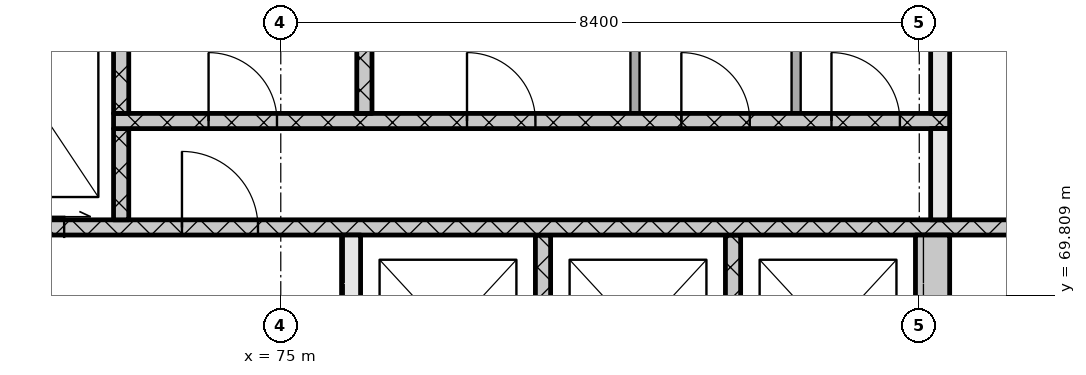
"""IFC4 building model, lengths in metres.
Left out: names, types, materials, properties, quantities, classifications, styles, units other than length and angle.
Written with IfcOpenShell. Run it as: python <this file> out.ifc"""

import sys

from ifc_helpers import new_model, si_unit, direction, frame, frame_2d, origin, place, context, subcontext, project, spatial, rectangle, extrude, element, fill, save


model = new_model("IFC4")
c1 = context("Model", 3, precision=1e-05, world=origin(), true_north=direction((0.0, 1.0)))
c2 = subcontext(c1, "Body", "Model", "MODEL_VIEW")
j1 = project(units=[si_unit("LENGTHUNIT", "METRE"), si_unit("PLANEANGLEUNIT", "RADIAN")], contexts=[c1])
p1 = place(None, origin())
s1 = spatial("IfcSite", under=j1, at=p1, CompositionType="ELEMENT")
p2 = place(p1, origin())
s2 = spatial("IfcBuilding", under=s1, at=p2, CompositionType="ELEMENT")
p3 = place(p2, frame((0.0, 0.0, 55.2)))
s3 = spatial("IfcBuildingStorey", under=s2, at=p3, CompositionType="ELEMENT", Elevation=55.2)
for number, where, z_axis, x_axis in (
    (1, (78.45, 68.0, 0.0), (0.0, 0.0, 1.0), (0.0, 1.0, 0.0)),
    (2, (80.95, 68.0, 0.0), (0.0, 0.0, 1.0), (0.0, 1.0, 0.0)),
):
    element("IfcWall", number, at=place(p3, frame(where, z_axis=z_axis, x_axis=x_axis)), inside=s3, PredefinedType="SOLIDWALL", context=c2, shape_type="SweptSolid", body=[
        extrude(rectangle(XDim=2.6, YDim=0.2, at=frame_2d((1.3, 0.0))), origin(), (0.0, 0.0, 1.0), 3.32),
    ])
p4 = place(p3, frame((83.575, 68.0, 0.0), z_axis=(0.0, 0.0, 1.0), x_axis=(0.0, 1.0, 0.0)))
e3 = element("IfcWall", 3, at=p4, inside=s3, PredefinedType="SOLIDWALL", context=c2, shape_type="SweptSolid", body=[
    extrude(rectangle(XDim=2.6, YDim=0.45, at=frame_2d((1.3, 0.0))), origin(), (0.0, 0.0, 1.0), 3.32),
])
p5 = place(p3, frame((75.925, 68.3, 0.0), z_axis=(0.0, 0.0, 1.0), x_axis=(0.0, 1.0, 0.0)))
e4 = element("IfcWall", 4, at=p5, inside=s3, PredefinedType="SOLIDWALL", context=c2, shape_type="SweptSolid", body=[
    extrude(rectangle(XDim=2.3, YDim=0.25, at=frame_2d((1.15, 0.0))), origin(), (0.0, 0.0, 1.0), 3.32),
])
p6 = place(p3, frame((67.8, 70.7, 0.0), z_axis=(0.0, 0.0, 1.0), x_axis=(1.0, 0.0, 0.0)))
e5 = element("IfcWall", 5, at=p6, inside=s3, PredefinedType="SOLIDWALL", context=c2, shape_type="SweptSolid", body=[
    extrude(rectangle(XDim=39.6, YDim=0.2, at=frame_2d((19.8, 0.0))), origin(), (0.0, 0.0, 1.0), 3.32),
])
p7 = place(p6, frame((0.65, 0.0, 0.0)))
e6 = element("IfcOpeningElement", 6, at=p7, cuts=e5, PredefinedType="OPENING", context=c2, shape_type="SweptSolid", body=[
    extrude(rectangle(XDim=1.1, YDim=2.1, at=frame_2d((0.55, 1.05))), frame((0.0, 0.11, 0.0), z_axis=(0.0, -1.0, 0.0), x_axis=(1.0, 0.0, 0.0)), (0.0, 0.0, 1.0), 0.22),
])
p8 = place(p6, frame((3.25, 0.0, 0.0)))
e7 = element("IfcOpeningElement", 7, at=p8, cuts=e5, PredefinedType="OPENING", context=c2, shape_type="SweptSolid", body=[
    extrude(rectangle(XDim=1.1, YDim=2.1, at=frame_2d((0.55, 1.05))), frame((0.0, 0.11, 0.0), z_axis=(0.0, -1.0, 0.0), x_axis=(1.0, 0.0, 0.0)), (0.0, 0.0, 1.0), 0.22),
])
p9 = place(p6, frame((5.9, 0.0, 0.0)))
e8 = element("IfcOpeningElement", 8, at=p9, cuts=e5, PredefinedType="OPENING", context=c2, shape_type="SweptSolid", body=[
    extrude(rectangle(XDim=1.0, YDim=2.1, at=frame_2d((0.5, 1.05))), frame((0.0, 0.11, 0.0), z_axis=(0.0, -1.0, 0.0), x_axis=(1.0, 0.0, 0.0)), (0.0, 0.0, 1.0), 0.22),
])
p10 = place(p6, frame((21.7, 0.0, 0.0)))
e9 = element("IfcOpeningElement", 9, at=p10, cuts=e5, PredefinedType="OPENING", context=c2, shape_type="SweptSolid", body=[
    extrude(rectangle(XDim=1.0, YDim=2.1, at=frame_2d((0.5, 1.05))), frame((0.0, 0.11, 0.0), z_axis=(0.0, -1.0, 0.0), x_axis=(1.0, 0.0, 0.0)), (0.0, 0.0, 1.0), 0.22),
])
p11 = place(p6, frame((32.7, 0.0, 0.0)))
e10 = element("IfcOpeningElement", 10, at=p11, cuts=e5, PredefinedType="OPENING", context=c2, shape_type="SweptSolid", body=[
    extrude(rectangle(XDim=1.0, YDim=2.1, at=frame_2d((0.5, 1.05))), frame((0.0, 0.11, 0.0), z_axis=(0.0, -1.0, 0.0), x_axis=(1.0, 0.0, 0.0)), (0.0, 0.0, 1.0), 0.22),
])
p12 = place(p6, frame((35.25, 0.0, 0.0)))
e11 = element("IfcOpeningElement", 11, at=p12, cuts=e5, PredefinedType="OPENING", context=c2, shape_type="SweptSolid", body=[
    extrude(rectangle(XDim=1.1, YDim=2.1, at=frame_2d((0.55, 1.05))), frame((0.0, 0.11, 0.0), z_axis=(0.0, -1.0, 0.0), x_axis=(1.0, 0.0, 0.0)), (0.0, 0.0, 1.0), 0.22),
])
p13 = place(p6, frame((37.85, 0.0, 0.0)))
e12 = element("IfcOpeningElement", 12, at=p13, cuts=e5, PredefinedType="OPENING", context=c2, shape_type="SweptSolid", body=[
    extrude(rectangle(XDim=1.1, YDim=2.1, at=frame_2d((0.55, 1.05))), frame((0.0, 0.11, 0.0), z_axis=(0.0, -1.0, 0.0), x_axis=(1.0, 0.0, 0.0)), (0.0, 0.0, 1.0), 0.22),
])
p14 = place(p3, frame((72.9, 70.8, 0.0), z_axis=(0.0, 0.0, 1.0), x_axis=(0.0, 1.0, 0.0)))
e13 = element("IfcWall", 13, at=p14, inside=s3, PredefinedType="SOLIDWALL", context=c2, shape_type="SweptSolid", body=[
    extrude(rectangle(XDim=1.2, YDim=0.2, at=frame_2d((0.6, 0.0))), origin(), (0.0, 0.0, 1.0), 3.32),
])
p15 = place(p3, frame((83.675, 70.8, 0.0), z_axis=(0.0, 0.0, 1.0), x_axis=(0.0, 1.0, 0.0)))
e14 = element("IfcWall", 14, at=p15, inside=s3, PredefinedType="SOLIDWALL", context=c2, shape_type="SweptSolid", body=[
    extrude(rectangle(XDim=1.2, YDim=0.25, at=frame_2d((0.6, 0.0))), origin(), (0.0, 0.0, 1.0), 3.32),
])
p16 = place(p3, frame((72.8, 72.1, 0.0), z_axis=(0.0, 0.0, 1.0), x_axis=(1.0, 0.0, 0.0)))
e15 = element("IfcWall", 15, at=p16, inside=s3, PredefinedType="SOLIDWALL", context=c2, shape_type="SweptSolid", body=[
    extrude(rectangle(XDim=11.0, YDim=0.2, at=frame_2d((5.5, 0.0))), origin(), (0.0, 0.0, 1.0), 3.32),
])
p17 = place(p16, frame((1.25, 0.0, 0.0)))
e16 = element("IfcOpeningElement", 16, at=p17, cuts=e15, PredefinedType="OPENING", context=c2, shape_type="SweptSolid", body=[
    extrude(rectangle(XDim=0.9, YDim=2.1, at=frame_2d((0.45, 1.05))), frame((0.0, 0.11, 0.0), z_axis=(0.0, -1.0, 0.0), x_axis=(1.0, 0.0, 0.0)), (0.0, 0.0, 1.0), 0.22),
])
p18 = place(p16, frame((4.65, 0.0, 0.0)))
e17 = element("IfcOpeningElement", 17, at=p18, cuts=e15, PredefinedType="OPENING", context=c2, shape_type="SweptSolid", body=[
    extrude(rectangle(XDim=0.9, YDim=2.1, at=frame_2d((0.45, 1.05))), frame((0.0, 0.11, 0.0), z_axis=(0.0, -1.0, 0.0), x_axis=(1.0, 0.0, 0.0)), (0.0, 0.0, 1.0), 0.22),
])
p19 = place(p16, frame((7.47, 0.0, 0.0)))
e18 = element("IfcOpeningElement", 18, at=p19, cuts=e15, PredefinedType="OPENING", context=c2, shape_type="SweptSolid", body=[
    extrude(rectangle(XDim=0.9, YDim=2.1, at=frame_2d((0.45, 1.05))), frame((0.0, 0.11, 0.0), z_axis=(0.0, -1.0, 0.0), x_axis=(1.0, 0.0, 0.0)), (0.0, 0.0, 1.0), 0.22),
])
p20 = place(p16, frame((9.445, 0.0, 0.0)))
e19 = element("IfcOpeningElement", 19, at=p20, cuts=e15, PredefinedType="OPENING", context=c2, shape_type="SweptSolid", body=[
    extrude(rectangle(XDim=0.9, YDim=2.1, at=frame_2d((0.45, 1.05))), frame((0.0, 0.11, 0.0), z_axis=(0.0, -1.0, 0.0), x_axis=(1.0, 0.0, 0.0)), (0.0, 0.0, 1.0), 0.22),
])
for number, where, z_axis, x_axis in (
    (20, (72.9, 72.2, 0.0), (0.0, 0.0, 1.0), (0.0, 1.0, 0.0)),
    (21, (76.1, 72.2, 0.0), (0.0, 0.0, 1.0), (0.0, 1.0, 0.0)),
):
    element("IfcWall", number, at=place(p3, frame(where, z_axis=z_axis, x_axis=x_axis)), inside=s3, PredefinedType="SOLIDWALL", context=c2, shape_type="SweptSolid", body=[
        extrude(rectangle(XDim=2.2, YDim=0.2, at=frame_2d((1.1, 0.0))), origin(), (0.0, 0.0, 1.0), 3.32),
    ])
for number, where, z_axis, x_axis in (
    (22, (79.66, 72.2, 0.0), (0.0, 0.0, 1.0), (0.0, 1.0, 0.0)),
    (23, (81.78, 72.2, 0.0), (0.0, 0.0, 1.0), (0.0, 1.0, 0.0)),
):
    element("IfcWall", number, at=place(p3, frame(where, z_axis=z_axis, x_axis=x_axis)), inside=s3, PredefinedType="PARTITIONING", context=c2, shape_type="SweptSolid", body=[
        extrude(rectangle(XDim=2.2, YDim=0.12, at=frame_2d((1.1, 0.0))), origin(), (0.0, 0.0, 1.0), 3.32),
    ])
p21 = place(p3, frame((83.675, 72.2, 0.0), z_axis=(0.0, 0.0, 1.0), x_axis=(0.0, 1.0, 0.0)))
e24 = element("IfcWall", 24, at=p21, inside=s3, PredefinedType="SOLIDWALL", context=c2, shape_type="SweptSolid", body=[
    extrude(rectangle(XDim=1.55, YDim=0.25, at=frame_2d((0.775, 0.0))), origin(), (0.0, 0.0, 1.0), 3.32),
])
p22 = place(p8, origin())
e25 = element("IfcDoor", 25, at=p22, inside=s3, OperationType="SLIDING_TO_RIGHT", PredefinedType="DOOR", context=c2, shape_type="SweptSolid", body=[
    extrude(rectangle(XDim=1.1, YDim=2.1, at=frame_2d((0.55, 1.05))), frame((0.0, 0.025, 0.0), z_axis=(0.0, -1.0, 0.0), x_axis=(1.0, 0.0, 0.0)), (0.0, 0.0, 1.0), 0.05),
])
fill(e7, e25)
p23 = place(p9, origin())
e26 = element("IfcDoor", 26, at=p23, inside=s3, OperationType="SINGLE_SWING_LEFT", PredefinedType="DOOR", context=c2, shape_type="SweptSolid", body=[
    extrude(rectangle(XDim=1.0, YDim=2.1, at=frame_2d((0.5, 1.05))), frame((0.0, 0.025, 0.0), z_axis=(0.0, -1.0, 0.0), x_axis=(1.0, 0.0, 0.0)), (0.0, 0.0, 1.0), 0.05),
])
fill(e8, e26)
p24 = place(p17, origin())
e27 = element("IfcDoor", 27, at=p24, inside=s3, OperationType="SINGLE_SWING_LEFT", PredefinedType="DOOR", context=c2, shape_type="SweptSolid", body=[
    extrude(rectangle(XDim=0.9, YDim=2.1, at=frame_2d((0.45, 1.05))), frame((0.0, 0.025, 0.0), z_axis=(0.0, -1.0, 0.0), x_axis=(1.0, 0.0, 0.0)), (0.0, 0.0, 1.0), 0.05),
])
fill(e16, e27)
p25 = place(p18, origin())
e28 = element("IfcDoor", 28, at=p25, inside=s3, OperationType="SINGLE_SWING_LEFT", PredefinedType="DOOR", context=c2, shape_type="SweptSolid", body=[
    extrude(rectangle(XDim=0.9, YDim=2.1, at=frame_2d((0.45, 1.05))), frame((0.0, 0.025, 0.0), z_axis=(0.0, -1.0, 0.0), x_axis=(1.0, 0.0, 0.0)), (0.0, 0.0, 1.0), 0.05),
])
fill(e17, e28)
p26 = place(p19, origin())
e29 = element("IfcDoor", 29, at=p26, inside=s3, OperationType="SINGLE_SWING_LEFT", PredefinedType="DOOR", context=c2, shape_type="SweptSolid", body=[
    extrude(rectangle(XDim=0.9, YDim=2.1, at=frame_2d((0.45, 1.05))), frame((0.0, 0.025, 0.0), z_axis=(0.0, -1.0, 0.0), x_axis=(1.0, 0.0, 0.0)), (0.0, 0.0, 1.0), 0.05),
])
fill(e18, e29)
p27 = place(p20, origin())
e30 = element("IfcDoor", 30, at=p27, inside=s3, OperationType="SINGLE_SWING_LEFT", PredefinedType="DOOR", context=c2, shape_type="SweptSolid", body=[
    extrude(rectangle(XDim=0.9, YDim=2.1, at=frame_2d((0.45, 1.05))), frame((0.0, 0.025, 0.0), z_axis=(0.0, -1.0, 0.0), x_axis=(1.0, 0.0, 0.0)), (0.0, 0.0, 1.0), 0.05),
])
fill(e19, e30)
save(model, sys.argv[1])
